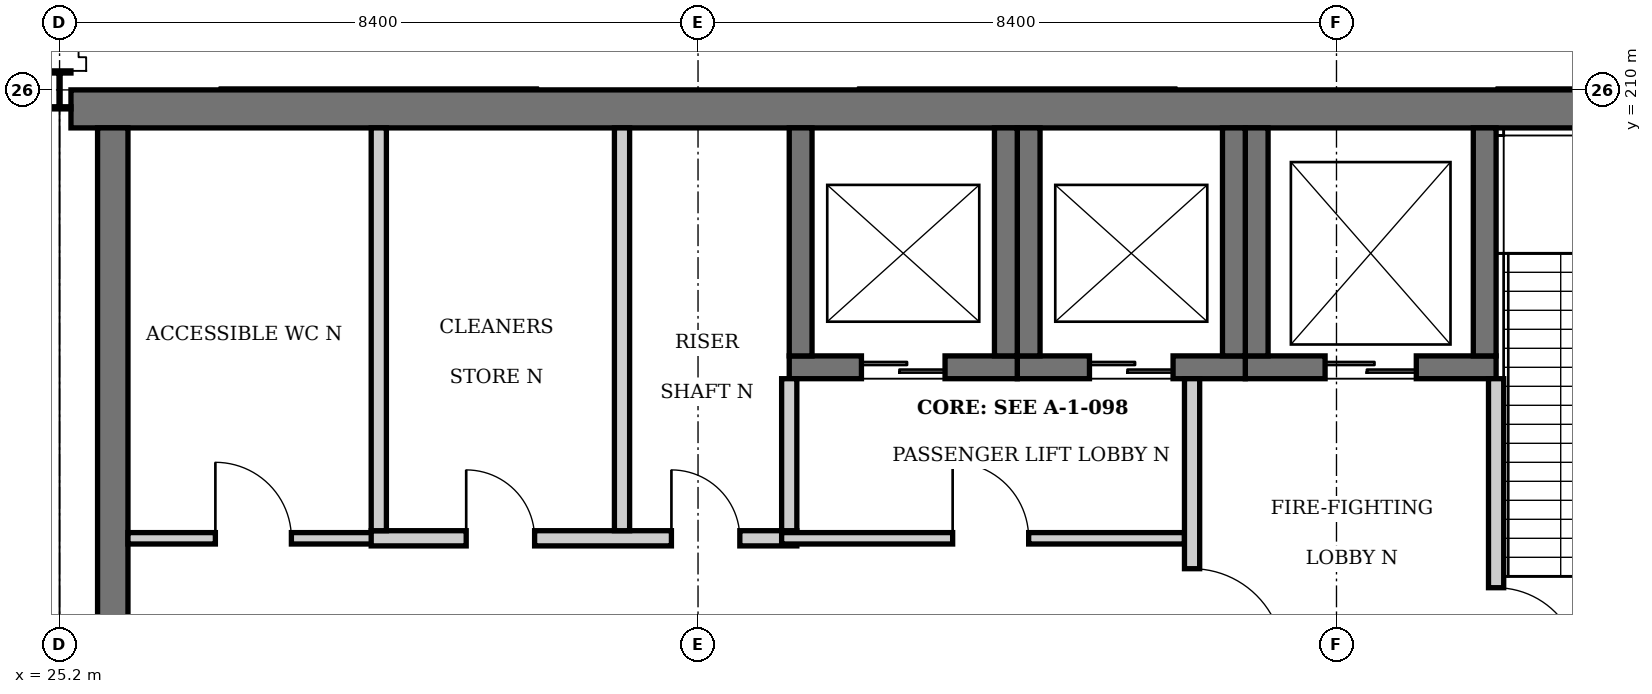
"""IFC4 building model, lengths in metres.
Left out: names, types, materials, properties, quantities, classifications, styles, units other than length and angle.
Written with IfcOpenShell. Run it as: python <this file> out.ifc"""

import sys

from ifc_helpers import new_model, si_unit, direction, frame, frame_2d, origin, origin_2d, place, context, subcontext, project, spatial, rectangle, i_section, extrude, element, fill, save


model = new_model("IFC4")
c1 = context("Model", 3, precision=1e-05, world=origin(), true_north=direction((0.0, 1.0)))
c2 = subcontext(c1, "Body", "Model", "MODEL_VIEW")
j1 = project(units=[si_unit("LENGTHUNIT", "METRE"), si_unit("PLANEANGLEUNIT", "RADIAN")], contexts=[c1])
p1 = place(None, origin())
s1 = spatial("IfcSite", under=j1, at=p1, CompositionType="ELEMENT")
p2 = place(p1, origin())
s2 = spatial("IfcBuilding", under=s1, at=p2, CompositionType="ELEMENT")
p3 = place(p2, frame((0.0, 0.0, 10.8)))
s3 = spatial("IfcBuildingStorey", under=s2, at=p3, CompositionType="ELEMENT", Elevation=10.8)
p4 = place(p3, frame((25.2, 210.0, 0.0), z_axis=(0.0, 0.0, 1.0), x_axis=(1.0, 0.0, 0.0)))
e1 = element("IfcColumn", 1, at=p4, inside=s3, PredefinedType="COLUMN", context=c2, shape_type="SweptSolid", body=[
    extrude(i_section(OverallWidth=0.3, OverallDepth=0.5, WebThickness=0.014, FlangeThickness=0.028, at=origin_2d()), origin(), (0.0, 0.0, 1.0), 6.3),
])
p5 = place(p3, frame((25.35, 209.75, 0.0), z_axis=(0.0, 0.0, 1.0), x_axis=(1.0, 0.0, 0.0)))
e2 = element("IfcWall", 2, at=p5, inside=s3, PredefinedType="SHEAR", context=c2, shape_type="SweptSolid", body=[
    extrude(rectangle(XDim=25.043, YDim=0.5, at=frame_2d((12.521, 0.0))), origin(), (0.0, 0.0, 1.0), 6.3),
])
p6 = place(p3, frame((25.9, 202.1, 0.0), z_axis=(0.0, 0.0, 1.0), x_axis=(0.0, 1.0, 0.0)))
e3 = element("IfcWall", 3, at=p6, inside=s3, PredefinedType="SHEAR", context=c2, shape_type="SweptSolid", body=[
    extrude(rectangle(XDim=7.4, YDim=0.4, at=frame_2d((3.7, 0.0))), origin(), (0.0, 0.0, 1.0), 6.3),
])
p7 = place(p3, frame((40.8, 206.35, 0.0), z_axis=(0.0, 0.0, 1.0), x_axis=(1.0, 0.0, 0.0)))
e4 = element("IfcWall", 4, at=p7, inside=s3, PredefinedType="SHEAR", context=c2, shape_type="SweptSolid", body=[
    extrude(rectangle(XDim=3.3, YDim=0.3, at=frame_2d((1.65, 0.0))), origin(), (0.0, 0.0, 1.0), 6.3),
])
p8 = place(p7, frame((1.05, 0.0, 0.0)))
e5 = element("IfcOpeningElement", 5, at=p8, cuts=e4, PredefinedType="OPENING", context=c2, shape_type="SweptSolid", body=[
    extrude(rectangle(XDim=1.2, YDim=2.1, at=frame_2d((0.6, 1.05))), frame((0.0, 0.16, 0.0), z_axis=(0.0, -1.0, 0.0), x_axis=(1.0, 0.0, 0.0)), (0.0, 0.0, 1.0), 0.32),
])
for number, where, z_axis, x_axis in (
    (6, (43.95, 206.5, 0.0), (0.0, 0.0, 1.0), (0.0, 1.0, 0.0)),
    (7, (40.95, 206.5, 0.0), (0.0, 0.0, 1.0), (0.0, 1.0, 0.0)),
):
    element("IfcWall", number, at=place(p3, frame(where, z_axis=z_axis, x_axis=x_axis)), inside=s3, PredefinedType="SHEAR", context=c2, shape_type="SweptSolid", body=[
        extrude(rectangle(XDim=3.0, YDim=0.3, at=frame_2d((1.5, 0.0))), origin(), (0.0, 0.0, 1.0), 6.3),
    ])
p9 = place(p3, frame((37.8, 206.35, 0.0), z_axis=(0.0, 0.0, 1.0), x_axis=(1.0, 0.0, 0.0)))
e8 = element("IfcWall", 8, at=p9, inside=s3, PredefinedType="SHEAR", context=c2, shape_type="SweptSolid", body=[
    extrude(rectangle(XDim=3.0, YDim=0.3, at=frame_2d((1.5, 0.0))), origin(), (0.0, 0.0, 1.0), 6.3),
])
p10 = place(p9, frame((0.95, 0.0, 0.0)))
e9 = element("IfcOpeningElement", 9, at=p10, cuts=e8, PredefinedType="OPENING", context=c2, shape_type="SweptSolid", body=[
    extrude(rectangle(XDim=1.1, YDim=2.1, at=frame_2d((0.55, 1.05))), frame((0.0, 0.16, 0.0), z_axis=(0.0, -1.0, 0.0), x_axis=(1.0, 0.0, 0.0)), (0.0, 0.0, 1.0), 0.32),
])
for number, where, z_axis, x_axis in (
    (10, (40.65, 206.5, 0.0), (0.0, 0.0, 1.0), (0.0, 1.0, 0.0)),
    (11, (37.95, 206.5, 0.0), (0.0, 0.0, 1.0), (0.0, 1.0, 0.0)),
):
    element("IfcWall", number, at=place(p3, frame(where, z_axis=z_axis, x_axis=x_axis)), inside=s3, PredefinedType="SHEAR", context=c2, shape_type="SweptSolid", body=[
        extrude(rectangle(XDim=3.0, YDim=0.3, at=frame_2d((1.5, 0.0))), origin(), (0.0, 0.0, 1.0), 6.3),
    ])
p11 = place(p3, frame((34.8, 206.35, 0.0), z_axis=(0.0, 0.0, 1.0), x_axis=(1.0, 0.0, 0.0)))
e12 = element("IfcWall", 12, at=p11, inside=s3, PredefinedType="SHEAR", context=c2, shape_type="SweptSolid", body=[
    extrude(rectangle(XDim=3.0, YDim=0.3, at=frame_2d((1.5, 0.0))), origin(), (0.0, 0.0, 1.0), 6.3),
])
p12 = place(p11, frame((0.95, 0.0, 0.0)))
e13 = element("IfcOpeningElement", 13, at=p12, cuts=e12, PredefinedType="OPENING", context=c2, shape_type="SweptSolid", body=[
    extrude(rectangle(XDim=1.1, YDim=2.1, at=frame_2d((0.55, 1.05))), frame((0.0, 0.16, 0.0), z_axis=(0.0, -1.0, 0.0), x_axis=(1.0, 0.0, 0.0)), (0.0, 0.0, 1.0), 0.32),
])
for number, where, z_axis, x_axis in (
    (14, (37.65, 206.5, 0.0), (0.0, 0.0, 1.0), (0.0, 1.0, 0.0)),
    (15, (34.95, 206.5, 0.0), (0.0, 0.0, 1.0), (0.0, 1.0, 0.0)),
):
    element("IfcWall", number, at=place(p3, frame(where, z_axis=z_axis, x_axis=x_axis)), inside=s3, PredefinedType="SHEAR", context=c2, shape_type="SweptSolid", body=[
        extrude(rectangle(XDim=3.0, YDim=0.3, at=frame_2d((1.5, 0.0))), origin(), (0.0, 0.0, 1.0), 6.3),
    ])
p13 = place(p3, frame((26.1, 204.1, 0.0), z_axis=(0.0, 0.0, 1.0), x_axis=(1.0, 0.0, 0.0)))
e16 = element("IfcWall", 16, at=p13, inside=s3, PredefinedType="PARTITIONING", context=c2, shape_type="SweptSolid", body=[
    extrude(rectangle(XDim=3.4, YDim=0.15, at=frame_2d((1.7, 0.0))), origin(), (0.0, 0.0, 1.0), 6.05),
])
p14 = place(p13, frame((1.15, 0.0, 0.0)))
e17 = element("IfcOpeningElement", 17, at=p14, cuts=e16, PredefinedType="OPENING", context=c2, shape_type="SweptSolid", body=[
    extrude(rectangle(XDim=1.0, YDim=2.1, at=frame_2d((0.5, 1.05))), frame((0.0, 0.085, 0.0), z_axis=(0.0, -1.0, 0.0), x_axis=(1.0, 0.0, 0.0)), (0.0, 0.0, 1.0), 0.17),
])
p15 = place(p3, frame((29.3, 204.1, 0.0), z_axis=(0.0, 0.0, 1.0), x_axis=(1.0, 0.0, 0.0)))
e18 = element("IfcWall", 18, at=p15, inside=s3, PredefinedType="PARTITIONING", context=c2, shape_type="SweptSolid", body=[
    extrude(rectangle(XDim=5.6, YDim=0.2, at=frame_2d((2.8, 0.0))), origin(), (0.0, 0.0, 1.0), 6.05),
])
p16 = place(p15, frame((3.95, 0.0, 0.0)))
e19 = element("IfcOpeningElement", 19, at=p16, cuts=e18, PredefinedType="OPENING", context=c2, shape_type="SweptSolid", body=[
    extrude(rectangle(XDim=0.9, YDim=2.1, at=frame_2d((0.45, 1.05))), frame((0.0, 0.11, 0.0), z_axis=(0.0, -1.0, 0.0), x_axis=(1.0, 0.0, 0.0)), (0.0, 0.0, 1.0), 0.22),
])
p17 = place(p15, frame((1.25, 0.0, 0.0)))
e20 = element("IfcOpeningElement", 20, at=p17, cuts=e18, PredefinedType="OPENING", context=c2, shape_type="SweptSolid", body=[
    extrude(rectangle(XDim=0.9, YDim=2.1, at=frame_2d((0.45, 1.05))), frame((0.0, 0.11, 0.0), z_axis=(0.0, -1.0, 0.0), x_axis=(1.0, 0.0, 0.0)), (0.0, 0.0, 1.0), 0.22),
])
p18 = place(p3, frame((34.7, 204.1, 0.0), z_axis=(0.0, 0.0, 1.0), x_axis=(1.0, 0.0, 0.0)))
e21 = element("IfcWall", 21, at=p18, inside=s3, PredefinedType="PARTITIONING", context=c2, shape_type="SweptSolid", body=[
    extrude(rectangle(XDim=5.3, YDim=0.15, at=frame_2d((2.65, 0.0))), origin(), (0.0, 0.0, 1.0), 6.05),
])
p19 = place(p18, frame((2.25, 0.0, 0.0)))
e22 = element("IfcOpeningElement", 22, at=p19, cuts=e21, PredefinedType="OPENING", context=c2, shape_type="SweptSolid", body=[
    extrude(rectangle(XDim=1.0, YDim=2.1, at=frame_2d((0.5, 1.05))), frame((0.0, 0.085, 0.0), z_axis=(0.0, -1.0, 0.0), x_axis=(1.0, 0.0, 0.0)), (0.0, 0.0, 1.0), 0.17),
])
for number, where, z_axis, x_axis in (
    (23, (29.4, 204.2, 0.0), (0.0, 0.0, 1.0), (0.0, 1.0, 0.0)),
    (24, (32.6, 204.2, 0.0), (0.0, 0.0, 1.0), (0.0, 1.0, 0.0)),
):
    element("IfcWall", number, at=place(p3, frame(where, z_axis=z_axis, x_axis=x_axis)), inside=s3, PredefinedType="PARTITIONING", context=c2, shape_type="SweptSolid", body=[
        extrude(rectangle(XDim=5.3, YDim=0.2, at=frame_2d((2.65, 0.0))), origin(), (0.0, 0.0, 1.0), 6.05),
    ])
p20 = place(p3, frame((34.8, 204.2, 0.0), z_axis=(0.0, 0.0, 1.0), x_axis=(0.0, 1.0, 0.0)))
e25 = element("IfcWall", 25, at=p20, inside=s3, PredefinedType="PARTITIONING", context=c2, shape_type="SweptSolid", body=[
    extrude(rectangle(XDim=2.0, YDim=0.2, at=frame_2d((1.0, 0.0))), origin(), (0.0, 0.0, 1.0), 6.05),
])
p21 = place(p3, frame((40.1, 202.1, 0.0), z_axis=(0.0, 0.0, 1.0), x_axis=(0.0, 1.0, 0.0)))
e26 = element("IfcWall", 26, at=p21, inside=s3, PredefinedType="PARTITIONING", context=c2, shape_type="SweptSolid", body=[
    extrude(rectangle(XDim=4.1, YDim=0.2, at=frame_2d((2.05, 0.0))), origin(), (0.0, 0.0, 1.0), 6.05),
])
p22 = place(p21, frame((0.4, 0.0, 0.0)))
e27 = element("IfcOpeningElement", 27, at=p22, cuts=e26, PredefinedType="OPENING", context=c2, shape_type="SweptSolid", body=[
    extrude(rectangle(XDim=1.2, YDim=2.4, at=frame_2d((0.6, 1.2))), frame((0.0, 0.11, 0.0), z_axis=(0.0, -1.0, 0.0), x_axis=(1.0, 0.0, 0.0)), (0.0, 0.0, 1.0), 0.22),
])
p23 = place(p3, frame((44.1, 202.1, 0.0), z_axis=(0.0, 0.0, 1.0), x_axis=(0.0, 1.0, 0.0)))
e28 = element("IfcWall", 28, at=p23, inside=s3, PredefinedType="PARTITIONING", context=c2, shape_type="SweptSolid", body=[
    extrude(rectangle(XDim=4.1, YDim=0.2, at=frame_2d((2.05, 0.0))), origin(), (0.0, 0.0, 1.0), 6.05),
])
p24 = place(p23, frame((0.25, 0.0, 0.0)))
e29 = element("IfcOpeningElement", 29, at=p24, cuts=e28, PredefinedType="OPENING", context=c2, shape_type="SweptSolid", body=[
    extrude(rectangle(XDim=1.1, YDim=2.4, at=frame_2d((0.55, 1.2))), frame((0.0, 0.11, 0.0), z_axis=(0.0, -1.0, 0.0), x_axis=(1.0, 0.0, 0.0)), (0.0, 0.0, 1.0), 0.22),
])
p25 = place(p19, origin())
e30 = element("IfcDoor", 30, at=p25, inside=s3, OperationType="SINGLE_SWING_LEFT", PredefinedType="DOOR", context=c2, shape_type="SweptSolid", body=[
    extrude(rectangle(XDim=1.0, YDim=2.1, at=frame_2d((0.5, 1.05))), frame((0.0, 0.025, 0.0), z_axis=(0.0, -1.0, 0.0), x_axis=(1.0, 0.0, 0.0)), (0.0, 0.0, 1.0), 0.05),
])
fill(e22, e30)
p26 = place(p22, frame((1.2, 0.0, 0.0), z_axis=(0.0, 0.0, 1.0), x_axis=(-1.0, 0.0, 0.0)))
e31 = element("IfcDoor", 31, at=p26, inside=s3, OperationType="SINGLE_SWING_RIGHT", PredefinedType="DOOR", context=c2, shape_type="SweptSolid", body=[
    extrude(rectangle(XDim=1.2, YDim=2.4, at=frame_2d((0.6, 1.2))), frame((0.0, 0.025, 0.0), z_axis=(0.0, -1.0, 0.0), x_axis=(1.0, 0.0, 0.0)), (0.0, 0.0, 1.0), 0.05),
])
fill(e27, e31)
p27 = place(p16, origin())
e32 = element("IfcDoor", 32, at=p27, inside=s3, OperationType="SINGLE_SWING_LEFT", PredefinedType="DOOR", context=c2, shape_type="SweptSolid", body=[
    extrude(rectangle(XDim=0.9, YDim=2.1, at=frame_2d((0.45, 1.05))), frame((0.0, 0.025, 0.0), z_axis=(0.0, -1.0, 0.0), x_axis=(1.0, 0.0, 0.0)), (0.0, 0.0, 1.0), 0.05),
])
fill(e19, e32)
p28 = place(p17, origin())
e33 = element("IfcDoor", 33, at=p28, inside=s3, OperationType="SINGLE_SWING_LEFT", PredefinedType="DOOR", context=c2, shape_type="SweptSolid", body=[
    extrude(rectangle(XDim=0.9, YDim=2.1, at=frame_2d((0.45, 1.05))), frame((0.0, 0.025, 0.0), z_axis=(0.0, -1.0, 0.0), x_axis=(1.0, 0.0, 0.0)), (0.0, 0.0, 1.0), 0.05),
])
fill(e20, e33)
p29 = place(p14, origin())
e34 = element("IfcDoor", 34, at=p29, inside=s3, OperationType="SINGLE_SWING_LEFT", PredefinedType="DOOR", context=c2, shape_type="SweptSolid", body=[
    extrude(rectangle(XDim=1.0, YDim=2.1, at=frame_2d((0.5, 1.05))), frame((0.0, 0.025, 0.0), z_axis=(0.0, -1.0, 0.0), x_axis=(1.0, 0.0, 0.0)), (0.0, 0.0, 1.0), 0.05),
])
fill(e17, e34)
p30 = place(p24, frame((1.1, 0.0, 0.0), z_axis=(0.0, 0.0, 1.0), x_axis=(-1.0, 0.0, 0.0)))
e35 = element("IfcDoor", 35, at=p30, inside=s3, OperationType="SINGLE_SWING_RIGHT", PredefinedType="DOOR", context=c2, shape_type="SweptSolid", body=[
    extrude(rectangle(XDim=1.1, YDim=2.4, at=frame_2d((0.55, 1.2))), frame((0.0, 0.025, 0.0), z_axis=(0.0, -1.0, 0.0), x_axis=(1.0, 0.0, 0.0)), (0.0, 0.0, 1.0), 0.05),
])
fill(e29, e35)
p31 = place(p8, origin())
e36 = element("IfcDoor", 36, at=p31, inside=s3, OperationType="SLIDING_TO_LEFT", PredefinedType="DOOR", context=c2, shape_type="SweptSolid", body=[
    extrude(rectangle(XDim=1.2, YDim=2.1, at=frame_2d((0.6, 1.05))), frame((0.0, 0.025, 0.0), z_axis=(0.0, -1.0, 0.0), x_axis=(1.0, 0.0, 0.0)), (0.0, 0.0, 1.0), 0.05),
])
fill(e5, e36)
p32 = place(p10, origin())
e37 = element("IfcDoor", 37, at=p32, inside=s3, OperationType="SLIDING_TO_LEFT", PredefinedType="DOOR", context=c2, shape_type="SweptSolid", body=[
    extrude(rectangle(XDim=1.1, YDim=2.1, at=frame_2d((0.55, 1.05))), frame((0.0, 0.025, 0.0), z_axis=(0.0, -1.0, 0.0), x_axis=(1.0, 0.0, 0.0)), (0.0, 0.0, 1.0), 0.05),
])
fill(e9, e37)
p33 = place(p12, origin())
e38 = element("IfcDoor", 38, at=p33, inside=s3, OperationType="SLIDING_TO_LEFT", PredefinedType="DOOR", context=c2, shape_type="SweptSolid", body=[
    extrude(rectangle(XDim=1.1, YDim=2.1, at=frame_2d((0.55, 1.05))), frame((0.0, 0.025, 0.0), z_axis=(0.0, -1.0, 0.0), x_axis=(1.0, 0.0, 0.0)), (0.0, 0.0, 1.0), 0.05),
])
fill(e13, e38)
save(model, sys.argv[1])
